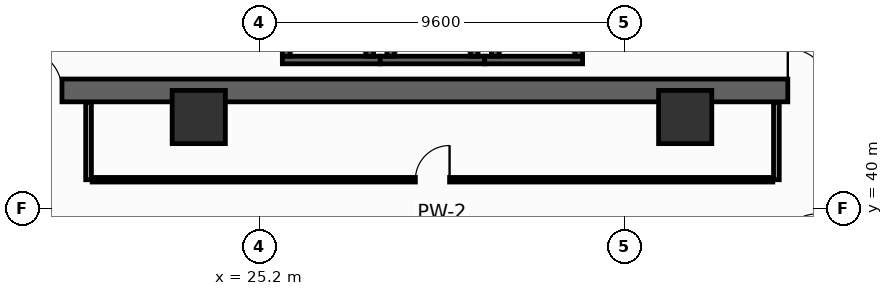
"""IFC4 building model, lengths in metres.
Left out: names, types, materials, properties, quantities, classifications, styles, units other than length and angle.
Written with IfcOpenShell. Run it as: python <this file> out.ifc"""

import sys

from ifc_helpers import new_model, si_unit, direction, frame, frame_2d, origin, origin_2d, place, context, subcontext, project, spatial, rectangle, hollow_rectangle, extrude, element, fill, save


model = new_model("IFC4")
c1 = context("Model", 3, precision=1e-05, world=origin(), true_north=direction((0.0, 1.0)))
c2 = subcontext(c1, "Body", "Model", "MODEL_VIEW")
j1 = project(units=[si_unit("LENGTHUNIT", "METRE"), si_unit("PLANEANGLEUNIT", "RADIAN")], contexts=[c1])
p1 = place(None, origin())
s1 = spatial("IfcSite", under=j1, at=p1, CompositionType="ELEMENT")
p2 = place(p1, origin())
s2 = spatial("IfcBuilding", under=s1, at=p2, CompositionType="ELEMENT")
p3 = place(p2, frame((0.0, 0.0, 33.0)))
s3 = spatial("IfcBuildingStorey", under=s2, at=p3, CompositionType="ELEMENT", Elevation=33.0)
p4 = place(p3, frame((13.5, 43.1, 0.0), z_axis=(0.0, 0.0, 1.0), x_axis=(1.0, 0.0, 0.0)))
e1 = element("IfcWall", 1, at=p4, inside=s3, PredefinedType="SHEAR", context=c2, shape_type="SweptSolid", body=[
    extrude(rectangle(XDim=32.9, YDim=0.6, at=frame_2d((16.45, 0.0))), origin(), (0.0, 0.0, 1.0), 4.95),
])
p5 = place(p4, frame((5.4, 0.0, 0.0)))
e2 = element("IfcOpeningElement", 2, at=p5, cuts=e1, PredefinedType="OPENING", context=c2, shape_type="SweptSolid", body=[
    extrude(rectangle(XDim=1.1, YDim=2.15, at=frame_2d((0.55, 1.075))), frame((0.0, 0.31, 0.0), z_axis=(0.0, -1.0, 0.0), x_axis=(1.0, 0.0, 0.0)), (0.0, 0.0, 1.0), 0.62),
])
p6 = place(p4, frame((25.6, 0.0, 0.0)))
e3 = element("IfcOpeningElement", 3, at=p6, cuts=e1, PredefinedType="OPENING", context=c2, shape_type="SweptSolid", body=[
    extrude(rectangle(XDim=1.1, YDim=2.15, at=frame_2d((0.55, 1.075))), frame((0.0, 0.31, 0.0), z_axis=(0.0, -1.0, 0.0), x_axis=(1.0, 0.0, 0.0)), (0.0, 0.0, 1.0), 0.62),
])
for number, where, z_axis, x_axis in (
    (4, (23.6, 42.4, 0.0), (0.0, 0.0, 1.0), (1.0, 0.0, 0.0)),
    (5, (36.4, 42.4, 0.0), (0.0, 0.0, 1.0), (1.0, 0.0, 0.0)),
):
    element("IfcColumn", number, at=place(p3, frame(where, z_axis=z_axis, x_axis=x_axis)), inside=s3, PredefinedType="COLUMN", context=c2, shape_type="SweptSolid", body=[
        extrude(hollow_rectangle(XDim=1.4, YDim=1.4, WallThickness=0.065, at=origin_2d()), origin(), (0.0, 0.0, 1.0), 5.4),
    ])
p7 = place(p3, frame((25.8, 43.9, 0.0), z_axis=(0.0, 0.0, 1.0), x_axis=(1.0, 0.0, 0.0)))
e6 = element("IfcWall", 6, at=p7, inside=s3, PredefinedType="SHEAR", context=c2, shape_type="SweptSolid", body=[
    extrude(rectangle(XDim=2.575, YDim=0.2, at=frame_2d((1.288, 0.0))), origin(), (0.0, 0.0, 1.0), 4.95),
])
for number, where, z_axis, x_axis in (
    (7, (25.9, 44.0, 0.0), (0.0, 0.0, 1.0), (0.0, 1.0, 0.0)),
    (8, (28.1, 44.0, 0.0), (0.0, 0.0, 1.0), (0.0, 1.0, 0.0)),
):
    element("IfcWall", number, at=place(p3, frame(where, z_axis=z_axis, x_axis=x_axis)), inside=s3, PredefinedType="SHEAR", context=c2, shape_type="SweptSolid", body=[
        extrude(rectangle(XDim=2.3, YDim=0.2, at=frame_2d((1.15, 0.0))), origin(), (0.0, 0.0, 1.0), 4.95),
    ])
p8 = place(p3, frame((28.375, 43.9, 0.0), z_axis=(0.0, 0.0, 1.0), x_axis=(1.0, 0.0, 0.0)))
e9 = element("IfcWall", 9, at=p8, inside=s3, PredefinedType="SHEAR", context=c2, shape_type="SweptSolid", body=[
    extrude(rectangle(XDim=2.75, YDim=0.2, at=frame_2d((1.375, 0.0))), origin(), (0.0, 0.0, 1.0), 4.95),
])
for number, where, z_axis, x_axis in (
    (10, (28.65, 44.0, 0.0), (0.0, 0.0, 1.0), (0.0, 1.0, 0.0)),
    (11, (30.85, 44.0, 0.0), (0.0, 0.0, 1.0), (0.0, 1.0, 0.0)),
):
    element("IfcWall", number, at=place(p3, frame(where, z_axis=z_axis, x_axis=x_axis)), inside=s3, PredefinedType="SHEAR", context=c2, shape_type="SweptSolid", body=[
        extrude(rectangle(XDim=2.3, YDim=0.2, at=frame_2d((1.15, 0.0))), origin(), (0.0, 0.0, 1.0), 4.95),
    ])
p9 = place(p3, frame((31.125, 43.9, 0.0), z_axis=(0.0, 0.0, 1.0), x_axis=(1.0, 0.0, 0.0)))
e12 = element("IfcWall", 12, at=p9, inside=s3, PredefinedType="SHEAR", context=c2, shape_type="SweptSolid", body=[
    extrude(rectangle(XDim=2.575, YDim=0.2, at=frame_2d((1.288, 0.0))), origin(), (0.0, 0.0, 1.0), 4.95),
])
for number, where, z_axis, x_axis in (
    (13, (31.4, 44.0, 0.0), (0.0, 0.0, 1.0), (0.0, 1.0, 0.0)),
    (14, (33.6, 44.0, 0.0), (0.0, 0.0, 1.0), (0.0, 1.0, 0.0)),
):
    element("IfcWall", number, at=place(p3, frame(where, z_axis=z_axis, x_axis=x_axis)), inside=s3, PredefinedType="SHEAR", context=c2, shape_type="SweptSolid", body=[
        extrude(rectangle(XDim=2.3, YDim=0.2, at=frame_2d((1.15, 0.0))), origin(), (0.0, 0.0, 1.0), 4.95),
    ])
for number, where, z_axis, x_axis in (
    (15, (20.7, 40.75, 0.0), (0.0, 0.0, 1.0), (0.0, 1.0, 0.0)),
    (16, (38.8, 40.75, 0.0), (0.0, 0.0, 1.0), (0.0, 1.0, 0.0)),
):
    element("IfcWall", number, at=place(p3, frame(where, z_axis=z_axis, x_axis=x_axis)), inside=s3, PredefinedType="PARTITIONING", context=c2, shape_type="SweptSolid", body=[
        extrude(rectangle(XDim=2.03, YDim=0.15, at=frame_2d((1.015, 0.0))), origin(), (0.0, 0.0, 1.0), 4.95),
    ])
p10 = place(p3, frame((20.795, 40.75, 0.0), z_axis=(0.0, 0.0, 1.0), x_axis=(1.0, 0.0, 0.0)))
e17 = element("IfcWall", 17, at=p10, inside=s3, PredefinedType="PARTITIONING", context=c2, shape_type="SweptSolid", body=[
    extrude(rectangle(XDim=17.91, YDim=0.12, at=frame_2d((8.955, 0.0))), origin(), (0.0, 0.0, 1.0), 3.535),
])
p11 = place(p10, frame((8.505, 0.0, 0.0)))
e18 = element("IfcOpeningElement", 18, at=p11, cuts=e17, PredefinedType="OPENING", context=c2, shape_type="SweptSolid", body=[
    extrude(rectangle(XDim=0.9, YDim=2.1, at=frame_2d((0.45, 1.05))), frame((0.0, 0.07, 0.0), z_axis=(0.0, -1.0, 0.0), x_axis=(1.0, 0.0, 0.0)), (0.0, 0.0, 1.0), 0.14),
])
p12 = place(p5, origin())
e19 = element("IfcDoor", 19, at=p12, inside=s3, OperationType="SINGLE_SWING_LEFT", PredefinedType="DOOR", context=c2, shape_type="SweptSolid", body=[
    extrude(rectangle(XDim=1.1, YDim=2.15, at=frame_2d((0.55, 1.075))), frame((0.0, 0.025, 0.0), z_axis=(0.0, -1.0, 0.0), x_axis=(1.0, 0.0, 0.0)), (0.0, 0.0, 1.0), 0.05),
])
fill(e2, e19)
p13 = place(p6, origin())
e20 = element("IfcDoor", 20, at=p13, inside=s3, OperationType="SINGLE_SWING_LEFT", PredefinedType="DOOR", context=c2, shape_type="SweptSolid", body=[
    extrude(rectangle(XDim=1.1, YDim=2.15, at=frame_2d((0.55, 1.075))), frame((0.0, 0.025, 0.0), z_axis=(0.0, -1.0, 0.0), x_axis=(1.0, 0.0, 0.0)), (0.0, 0.0, 1.0), 0.05),
])
fill(e3, e20)
p14 = place(p11, origin())
e21 = element("IfcDoor", 21, at=p14, inside=s3, OperationType="SINGLE_SWING_RIGHT", PredefinedType="DOOR", context=c2, shape_type="SweptSolid", body=[
    extrude(rectangle(XDim=0.9, YDim=2.1, at=frame_2d((0.45, 1.05))), frame((0.0, 0.025, 0.0), z_axis=(0.0, -1.0, 0.0), x_axis=(1.0, 0.0, 0.0)), (0.0, 0.0, 1.0), 0.05),
])
fill(e18, e21)
save(model, sys.argv[1])
